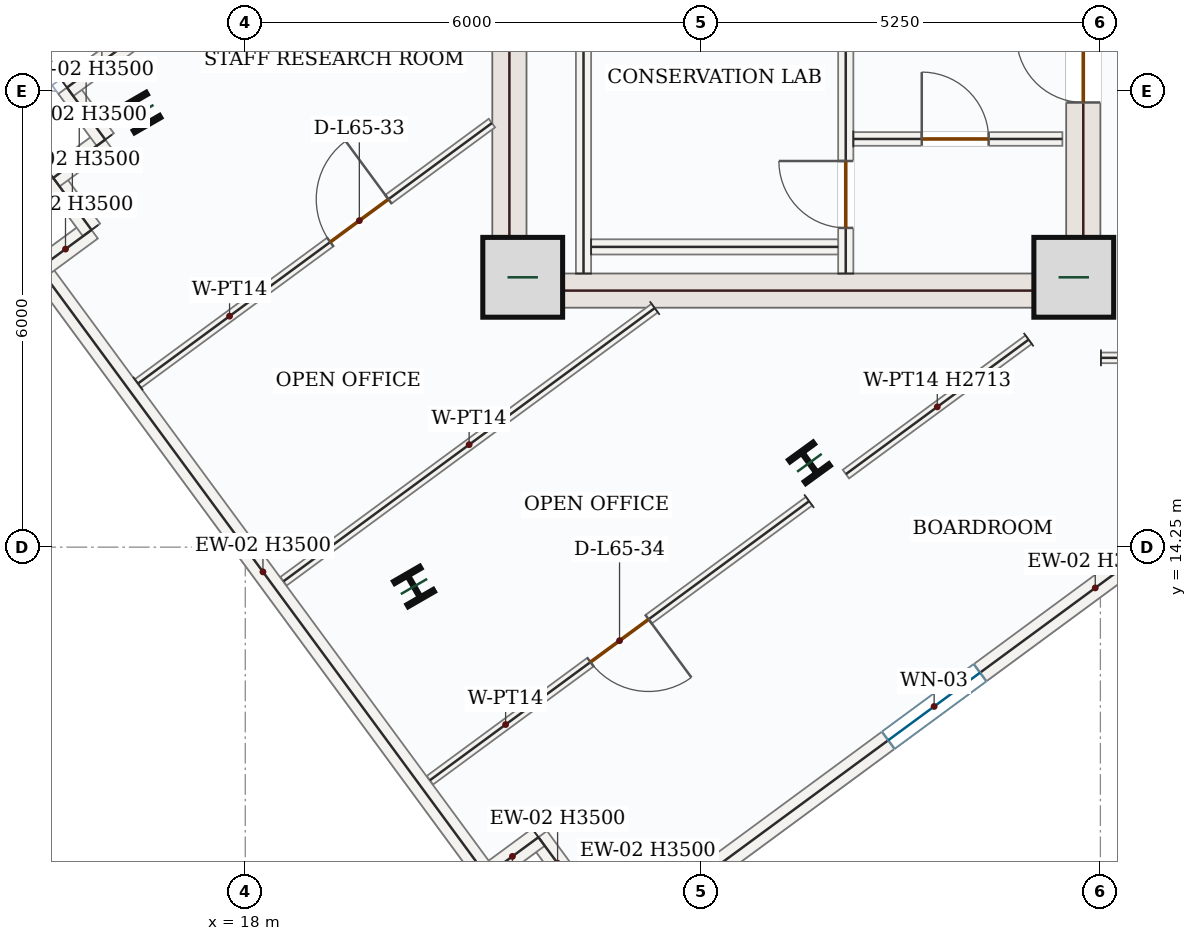
"""IFC4 building model, lengths in metres.
Left out: names, types, materials, properties, quantities, classifications, styles, units other than length and angle.
Written with IfcOpenShell. Run it as: python <this file> out.ifc"""

import sys

from ifc_helpers import new_model, si_unit, direction, frame, frame_2d, origin, origin_2d, place, context, subcontext, project, spatial, rectangle, i_section, extrude, source, transform, mapped, element, fill, save


model = new_model("IFC4")
c1 = context("Model", 3, precision=1e-05, world=origin(), true_north=direction((0.0, 1.0)))
c2 = subcontext(c1, "Body", "Model", "MODEL_VIEW")
j1 = project(units=[si_unit("LENGTHUNIT", "METRE"), si_unit("PLANEANGLEUNIT", "RADIAN")], contexts=[c1])
p1 = place(None, origin())
s1 = spatial("IfcSite", under=j1, at=p1, CompositionType="ELEMENT")
p2 = place(p1, origin())
s2 = spatial("IfcBuilding", under=s1, at=p2, CompositionType="ELEMENT")
p3 = place(p2, frame((0.0, 0.0, 272.85)))
s3 = spatial("IfcBuildingStorey", under=s2, at=p3, CompositionType="ELEMENT", Elevation=272.85)
m1 = source(origin(), c2, "Body", "SweptSolid", [
    extrude(rectangle(XDim=8.55, YDim=0.45, at=frame_2d((4.275, 0.0))), origin(), (0.0, 0.0, 1.0), 3.5),
])
p4 = place(p3, frame((21.475, 17.4, 0.0), z_axis=(0.0, 0.0, 1.0), x_axis=(0.0, 1.0, 0.0)))
e1 = element("IfcWall", 1, at=p4, inside=s3, PredefinedType="SHEAR", context=c2, shape_type="MappedRepresentation", body=[
    mapped(m1, transform((0.0, 0.0, 0.0), x_axis=(1.0, 0.0, 0.0), y_axis=(0.0, 1.0, 0.0), z_axis=(0.0, 0.0, 1.0), scale=1.0)),
])
p5 = place(p3, frame((29.025, 17.4, 0.0), z_axis=(0.0, 0.0, 1.0), x_axis=(0.0, 1.0, 0.0)))
e2 = element("IfcWall", 2, at=p5, inside=s3, PredefinedType="SHEAR", context=c2, shape_type="SweptSolid", body=[
    extrude(rectangle(XDim=8.55, YDim=0.45, at=frame_2d((4.275, 0.0))), origin(), (0.0, 0.0, 1.0), 3.5),
])
p6 = place(p5, frame((6.65, 0.0, 0.0)))
e3 = element("IfcOpeningElement", 3, at=p6, cuts=e2, PredefinedType="OPENING", context=c2, shape_type="SweptSolid", body=[
    extrude(rectangle(XDim=1.1, YDim=2.2, at=frame_2d((0.55, 1.1))), frame((0.0, 0.235, 0.0), z_axis=(0.0, -1.0, 0.0), x_axis=(1.0, 0.0, 0.0)), (0.0, 0.0, 1.0), 0.47),
])
p7 = place(p5, frame((2.7, 0.0, 0.0)))
e4 = element("IfcOpeningElement", 4, at=p7, cuts=e2, PredefinedType="OPENING", context=c2, shape_type="SweptSolid", body=[
    extrude(rectangle(XDim=0.88, YDim=2.1, at=frame_2d((0.44, 1.05))), frame((0.0, 0.235, 0.0), z_axis=(0.0, -1.0, 0.0), x_axis=(1.0, 0.0, 0.0)), (0.0, 0.0, 1.0), 0.47),
])
p8 = place(p5, frame((4.6, 0.0, 0.0)))
e5 = element("IfcOpeningElement", 5, at=p8, cuts=e2, PredefinedType="OPENING", context=c2, shape_type="SweptSolid", body=[
    extrude(rectangle(XDim=0.88, YDim=2.1, at=frame_2d((0.44, 1.05))), frame((0.0, 0.235, 0.0), z_axis=(0.0, -1.0, 0.0), x_axis=(1.0, 0.0, 0.0)), (0.0, 0.0, 1.0), 0.47),
])
m2 = source(origin(), c2, "Body", "SweptSolid", [
    extrude(rectangle(XDim=7.1, YDim=0.45, at=frame_2d((3.55, 0.0))), origin(), (0.0, 0.0, 1.0), 3.5),
])
p9 = place(p3, frame((21.7, 17.625, 0.0), z_axis=(0.0, 0.0, 1.0), x_axis=(1.0, 0.0, 0.0)))
e6 = element("IfcWall", 6, at=p9, inside=s3, PredefinedType="SHEAR", context=c2, shape_type="MappedRepresentation", body=[
    mapped(m2, transform((0.0, 0.0, 0.0), x_axis=(1.0, 0.0, 0.0), y_axis=(0.0, 1.0, 0.0), z_axis=(0.0, 0.0, 1.0), scale=1.0)),
])
m3 = source(origin(), c2, "Body", "SweptSolid", [
    extrude(rectangle(XDim=1.05, YDim=1.05, at=origin_2d()), origin(), (0.0, 0.0, 1.0), 3.75),
])
for number, where, z_axis, x_axis in (
    (7, (21.65, 17.8, 0.0), (0.0, 0.0, 1.0), (1.0, 0.0, 0.0)),
    (8, (28.9, 17.8, 0.0), (0.0, 0.0, 1.0), (1.0, 0.0, 0.0)),
):
    element("IfcColumn", number, at=place(p3, frame(where, z_axis=z_axis, x_axis=x_axis)), inside=s3, PredefinedType="COLUMN", context=c2, shape_type="MappedRepresentation", body=[
        mapped(m3, transform((0.0, 0.0, 0.0), x_axis=(1.0, 0.0, 0.0), y_axis=(0.0, 1.0, 0.0), z_axis=(0.0, 0.0, 1.0), scale=1.0)),
    ])
m4 = source(origin(), c2, "Body", "SweptSolid", [
    extrude(i_section(OverallWidth=0.399, OverallDepth=0.386, WebThickness=0.021, FlangeThickness=0.033, FilletRadius=0.018, at=origin_2d()), origin(), (0.0, 0.0, 1.0), 3.75),
])
for number, where, z_axis, x_axis in (
    (9, (25.422, 15.359, 0.0), (0.0, 0.0, 1.0), (0.809, 0.588, 0.0)),
    (10, (16.62, 19.968, 0.0), (0.0, 0.0, 1.0), (0.866, 0.5, 0.0)),
    (11, (20.22, 13.732, 0.0), (0.0, 0.0, 1.0), (0.866, 0.5, 0.0)),
):
    element("IfcColumn", number, at=place(p3, frame(where, z_axis=z_axis, x_axis=x_axis)), inside=s3, PredefinedType="COLUMN", context=c2, shape_type="MappedRepresentation", body=[
        mapped(m4, transform((0.0, 0.0, 0.0), x_axis=(1.0, 0.0, 0.0), y_axis=(0.0, 1.0, 0.0), z_axis=(0.0, 0.0, 1.0), scale=1.0)),
    ])
p10 = place(p3, frame((30.577, 14.74, 0.0), z_axis=(0.0, 0.0, 1.0), x_axis=(-0.805403112922, -0.592727446383, 0.0)))
e12 = element("IfcWall", 12, at=p10, inside=s3, PredefinedType="SOLIDWALL", context=c2, shape_type="SweptSolid", body=[
    extrude(rectangle(XDim=8.726, YDim=0.28, at=frame_2d((4.363, 0.0))), origin(), (0.0, 0.0, 1.0), 3.5),
])
p11 = place(p10, frame((3.613, 0.0, 0.85)))
e13 = element("IfcOpeningElement", 13, at=p11, cuts=e12, PredefinedType="OPENING", context=c2, shape_type="SweptSolid", body=[
    extrude(rectangle(XDim=1.5, YDim=1.5, at=frame_2d((0.75, 0.75))), frame((0.0, 0.15, 0.0), z_axis=(0.0, -1.0, 0.0), x_axis=(1.0, 0.0, 0.0)), (0.0, 0.0, 1.0), 0.3),
])
m5 = source(origin(), c2, "Body", "SweptSolid", [
    extrude(rectangle(XDim=0.85, YDim=0.28, at=frame_2d((0.425, 0.0))), origin(), (0.0, 0.0, 1.0), 3.5),
])
p12 = place(p3, frame((23.549, 9.568, 0.0), z_axis=(0.0, 0.0, 1.0), x_axis=(-0.592807079659, 0.80534450163, 0.0)))
e14 = element("IfcWall", 14, at=p12, inside=s3, PredefinedType="SOLIDWALL", context=c2, shape_type="MappedRepresentation", body=[
    mapped(m5, transform((0.0, 0.0, 0.0), x_axis=(1.0, 0.0, 0.0), y_axis=(0.0, 1.0, 0.0), z_axis=(0.0, 0.0, 1.0), scale=1.0)),
])
m6 = source(origin(), c2, "Body", "SweptSolid", [
    extrude(rectangle(XDim=0.85, YDim=0.28, at=frame_2d((0.425, 0.0))), origin(), (0.0, 0.0, 1.0), 3.5),
])
for number, where, z_axis, x_axis in (
    (15, (23.045, 10.253, 0.0), (0.0, 0.0, 1.0), (-0.805, -0.593, 0.0)),
    (16, (22.361, 9.749, 0.0), (0.0, 0.0, 1.0), (-0.593, 0.805, 0.0)),
):
    element("IfcWall", number, at=place(p3, frame(where, z_axis=z_axis, x_axis=x_axis)), inside=s3, PredefinedType="SOLIDWALL", context=c2, shape_type="MappedRepresentation", body=[
        mapped(m6, transform((0.0, 0.0, 0.0), x_axis=(1.0, 0.0, 0.0), y_axis=(0.0, 1.0, 0.0), z_axis=(0.0, 0.0, 1.0), scale=1.0)),
    ])
p13 = place(p3, frame((21.857, 10.434, 0.0), z_axis=(0.0, 0.0, 1.0), x_axis=(-0.80534450163, -0.592807079659, 0.0)))
e17 = element("IfcWall", 17, at=p13, inside=s3, PredefinedType="SOLIDWALL", context=c2, shape_type="MappedRepresentation", body=[
    mapped(m5, transform((0.0, 0.0, 0.0), x_axis=(1.0, 0.0, 0.0), y_axis=(0.0, 1.0, 0.0), z_axis=(0.0, 0.0, 1.0), scale=1.0)),
])
m7 = source(origin(), c2, "Body", "SweptSolid", [
    extrude(rectangle(XDim=9.92, YDim=0.28, at=frame_2d((4.96, 0.0))), origin(), (0.0, 0.0, 1.0), 3.5),
])
p14 = place(p3, frame((21.173, 9.93, 0.0), z_axis=(0.0, 0.0, 1.0), x_axis=(-0.592722097771, 0.805407049146, 0.0)))
e18 = element("IfcWall", 18, at=p14, inside=s3, PredefinedType="SOLIDWALL", context=c2, shape_type="MappedRepresentation", body=[
    mapped(m7, transform((0.0, 0.0, 0.0), x_axis=(1.0, 0.0, 0.0), y_axis=(0.0, 1.0, 0.0), z_axis=(0.0, 0.0, 1.0), scale=1.0)),
])
for number, where, z_axis, x_axis in (
    (19, (15.293, 17.919, 0.0), (0.0, 0.0, 1.0), (0.805, 0.593, 0.0)),
    (20, (15.977, 18.423, 0.0), (0.0, 0.0, 1.0), (-0.593, 0.805, 0.0)),
):
    element("IfcWall", number, at=place(p3, frame(where, z_axis=z_axis, x_axis=x_axis)), inside=s3, PredefinedType="SOLIDWALL", context=c2, shape_type="MappedRepresentation", body=[
        mapped(m5, transform((0.0, 0.0, 0.0), x_axis=(1.0, 0.0, 0.0), y_axis=(0.0, 1.0, 0.0), z_axis=(0.0, 0.0, 1.0), scale=1.0)),
    ])
m8 = source(origin(), c2, "Body", "SweptSolid", [
    extrude(rectangle(XDim=0.85, YDim=0.28, at=frame_2d((0.425, 0.0))), origin(), (0.0, 0.0, 1.0), 3.5),
])
p15 = place(p3, frame((15.473, 19.108, 0.0), z_axis=(0.0, 0.0, 1.0), x_axis=(0.805445398986, 0.592669983425, 0.0)))
e21 = element("IfcWall", 21, at=p15, inside=s3, PredefinedType="SOLIDWALL", context=c2, shape_type="MappedRepresentation", body=[
    mapped(m8, transform((0.0, 0.0, 0.0), x_axis=(1.0, 0.0, 0.0), y_axis=(0.0, 1.0, 0.0), z_axis=(0.0, 0.0, 1.0), scale=1.0)),
])
p16 = place(p3, frame((16.158, 19.612, 0.0), z_axis=(0.0, 0.0, 1.0), x_axis=(-0.592807079659, 0.80534450163, 0.0)))
e22 = element("IfcWall", 22, at=p16, inside=s3, PredefinedType="SOLIDWALL", context=c2, shape_type="MappedRepresentation", body=[
    mapped(m5, transform((0.0, 0.0, 0.0), x_axis=(1.0, 0.0, 0.0), y_axis=(0.0, 1.0, 0.0), z_axis=(0.0, 0.0, 1.0), scale=1.0)),
])
p17 = place(p3, frame((15.654, 20.296, 0.0), z_axis=(0.0, 0.0, 1.0), x_axis=(0.805410687764, 0.592717153486, 0.0)))
e23 = element("IfcWall", 23, at=p17, inside=s3, PredefinedType="SOLIDWALL", context=c2, shape_type="SweptSolid", body=[
    extrude(rectangle(XDim=4.079, YDim=0.28, at=frame_2d((2.04, 0.0))), origin(), (0.0, 0.0, 1.0), 3.5),
])
p18 = place(p17, frame((1.29, 0.0, 0.85)))
e24 = element("IfcOpeningElement", 24, at=p18, cuts=e23, PredefinedType="OPENING", context=c2, shape_type="SweptSolid", body=[
    extrude(rectangle(XDim=1.5, YDim=1.5, at=frame_2d((0.75, 0.75))), frame((0.0, 0.15, 0.0), z_axis=(0.0, -1.0, 0.0), x_axis=(1.0, 0.0, 0.0)), (0.0, 0.0, 1.0), 0.3),
])
m9 = source(origin(), c2, "Body", "SweptSolid", [
    extrude(rectangle(XDim=7.87, YDim=0.2, at=frame_2d((3.935, 0.0))), origin(), (0.0, 0.0, 1.0), 3.5),
])
p19 = place(p3, frame((22.45, 17.85, 0.0), z_axis=(0.0, 0.0, 1.0), x_axis=(0.0, 1.0, 0.0)))
e25 = element("IfcWall", 25, at=p19, inside=s3, PredefinedType="SOLIDWALL", context=c2, shape_type="MappedRepresentation", body=[
    mapped(m9, transform((0.0, 0.0, 0.0), x_axis=(1.0, 0.0, 0.0), y_axis=(0.0, 1.0, 0.0), z_axis=(0.0, 0.0, 1.0), scale=1.0)),
])
p20 = place(p3, frame((25.9, 17.85, 0.0), z_axis=(0.0, 0.0, 1.0), x_axis=(0.0, 1.0, 0.0)))
e26 = element("IfcWall", 26, at=p20, inside=s3, PredefinedType="SOLIDWALL", context=c2, shape_type="SweptSolid", body=[
    extrude(rectangle(XDim=8.0, YDim=0.2, at=frame_2d((4.0, 0.0))), origin(), (0.0, 0.0, 1.0), 3.5),
])
p21 = place(p20, frame((6.2, 0.0, 0.0)))
e27 = element("IfcOpeningElement", 27, at=p21, cuts=e26, PredefinedType="OPENING", context=c2, shape_type="SweptSolid", body=[
    extrude(rectangle(XDim=1.0, YDim=2.15, at=frame_2d((0.5, 1.075))), frame((0.0, 0.11, 0.0), z_axis=(0.0, -1.0, 0.0), x_axis=(1.0, 0.0, 0.0)), (0.0, 0.0, 1.0), 0.22),
])
p22 = place(p20, frame((0.6, 0.0, 0.0)))
e28 = element("IfcOpeningElement", 28, at=p22, cuts=e26, PredefinedType="OPENING", context=c2, shape_type="SweptSolid", body=[
    extrude(rectangle(XDim=0.88, YDim=2.1, at=frame_2d((0.44, 1.05))), frame((0.0, 0.11, 0.0), z_axis=(0.0, -1.0, 0.0), x_axis=(1.0, 0.0, 0.0)), (0.0, 0.0, 1.0), 0.22),
])
m10 = source(origin(), c2, "Body", "SweptSolid", [
    extrude(rectangle(XDim=3.25, YDim=0.2, at=frame_2d((1.625, 0.0))), origin(), (0.0, 0.0, 1.0), 3.5),
])
p23 = place(p3, frame((22.55, 18.2, 0.0), z_axis=(0.0, 0.0, 1.0), x_axis=(1.0, 0.0, 0.0)))
e29 = element("IfcWall", 29, at=p23, inside=s3, PredefinedType="SOLIDWALL", context=c2, shape_type="MappedRepresentation", body=[
    mapped(m10, transform((0.0, 0.0, 0.0), x_axis=(1.0, 0.0, 0.0), y_axis=(0.0, 1.0, 0.0), z_axis=(0.0, 0.0, 1.0), scale=1.0)),
])
p24 = place(p3, frame((26.0, 19.62, 0.0), z_axis=(0.0, 0.0, 1.0), x_axis=(1.0, 0.0, 0.0)))
e30 = element("IfcWall", 30, at=p24, inside=s3, PredefinedType="PARTITIONING", context=c2, shape_type="SweptSolid", body=[
    extrude(rectangle(XDim=2.75, YDim=0.18, at=frame_2d((1.375, 0.0))), origin(), (0.0, 0.0, 1.0), 3.5),
])
p25 = place(p24, frame((0.9, 0.0, 0.0)))
e31 = element("IfcOpeningElement", 31, at=p25, cuts=e30, PredefinedType="OPENING", context=c2, shape_type="SweptSolid", body=[
    extrude(rectangle(XDim=0.88, YDim=2.1, at=frame_2d((0.44, 1.05))), frame((0.0, 0.1, 0.0), z_axis=(0.0, -1.0, 0.0), x_axis=(1.0, 0.0, 0.0)), (0.0, 0.0, 1.0), 0.2),
])
m11 = source(origin(), c2, "Body", "SweptSolid", [
    extrude(rectangle(XDim=6.063, YDim=0.14, at=frame_2d((3.032, 0.0))), origin(), (0.0, 0.0, 1.0), 3.5),
])
p26 = place(p3, frame((23.387, 17.395, 0.0), z_axis=(0.0, 0.0, 1.0), x_axis=(-0.805422045282, -0.59270172007, 0.0)))
e32 = element("IfcWall", 32, at=p26, inside=s3, PredefinedType="PARTITIONING", context=c2, shape_type="MappedRepresentation", body=[
    mapped(m11, transform((0.0, 0.0, 0.0), x_axis=(1.0, 0.0, 0.0), y_axis=(0.0, 1.0, 0.0), z_axis=(0.0, 0.0, 1.0), scale=1.0)),
])
p27 = place(p3, frame((16.589, 16.403, 0.0), z_axis=(0.0, 0.0, 1.0), x_axis=(0.80540492624, 0.592724982423, 0.0)))
e33 = element("IfcWall", 33, at=p27, inside=s3, PredefinedType="PARTITIONING", context=c2, shape_type="SweptSolid", body=[
    extrude(rectangle(XDim=5.781, YDim=0.14, at=frame_2d((2.891, 0.0))), origin(), (0.0, 0.0, 1.0), 3.5),
])
p28 = place(p27, frame((3.14, 0.0, 0.0)))
e34 = element("IfcOpeningElement", 34, at=p28, cuts=e33, PredefinedType="OPENING", context=c2, shape_type="SweptSolid", body=[
    extrude(rectangle(XDim=0.95, YDim=2.15, at=frame_2d((0.475, 1.075))), frame((0.0, 0.08, 0.0), z_axis=(0.0, -1.0, 0.0), x_axis=(1.0, 0.0, 0.0)), (0.0, 0.0, 1.0), 0.16),
])
m12 = source(origin(), c2, "Body", "SweptSolid", [
    extrude(rectangle(XDim=2.985, YDim=0.14, at=frame_2d((1.492, 0.0))), origin(), (0.0, 0.0, 1.0), 2.713),
])
p29 = place(p3, frame((28.306, 16.98, 0.0), z_axis=(0.0, 0.0, 1.0), x_axis=(-0.80539491033, -0.592738591973, 0.0)))
e35 = element("IfcWall", 35, at=p29, inside=s3, PredefinedType="PARTITIONING", context=c2, shape_type="MappedRepresentation", body=[
    mapped(m12, transform((0.0, 0.0, 0.0), x_axis=(1.0, 0.0, 0.0), y_axis=(0.0, 1.0, 0.0), z_axis=(0.0, 0.0, 1.0), scale=1.0)),
])
p30 = place(p3, frame((25.418, 14.854, 0.0), z_axis=(0.0, 0.0, 1.0), x_axis=(-0.805402487917, -0.592728295645, 0.0)))
e36 = element("IfcWall", 36, at=p30, inside=s3, PredefinedType="PARTITIONING", context=c2, shape_type="SweptSolid", body=[
    extrude(rectangle(XDim=6.193, YDim=0.14, at=frame_2d((3.097, 0.0))), origin(), (0.0, 0.0, 1.0), 3.5),
])
p31 = place(p30, frame((2.622, 0.0, 0.0)))
e37 = element("IfcOpeningElement", 37, at=p31, cuts=e36, PredefinedType="OPENING", context=c2, shape_type="SweptSolid", body=[
    extrude(rectangle(XDim=0.95, YDim=2.15, at=frame_2d((0.475, 1.075))), frame((0.0, 0.08, 0.0), z_axis=(0.0, -1.0, 0.0), x_axis=(1.0, 0.0, 0.0)), (0.0, 0.0, 1.0), 0.16),
])
p32 = place(p3, frame((29.258, 16.74, 0.0), z_axis=(0.0, 0.0, 1.0), x_axis=(0.999999998895, -4.7021207e-05, 0.0)))
e38 = element("IfcWall", 38, at=p32, inside=s3, PredefinedType="PARTITIONING", context=c2, shape_type="SweptSolid", body=[
    extrude(rectangle(XDim=5.192, YDim=0.14, at=frame_2d((2.596, 0.0))), origin(), (0.0, 0.0, 1.0), 3.5),
])
p33 = place(p32, frame((3.309, 0.0, 0.0)))
e39 = element("IfcOpeningElement", 39, at=p33, cuts=e38, PredefinedType="OPENING", context=c2, shape_type="SweptSolid", body=[
    extrude(rectangle(XDim=0.95, YDim=2.15, at=frame_2d((0.475, 1.075))), frame((0.0, 0.08, 0.0), z_axis=(0.0, -1.0, 0.0), x_axis=(1.0, 0.0, 0.0)), (0.0, 0.0, 1.0), 0.16),
])
m13 = source(origin(), c2, "Body", "SweptSolid", [
    extrude(rectangle(XDim=1.5, YDim=1.5, at=frame_2d((0.75, 0.75))), frame((0.0, 0.03, 0.0), z_axis=(0.0, -1.0, 0.0), x_axis=(1.0, 0.0, 0.0)), (0.0, 0.0, 1.0), 0.06),
])
p34 = place(p11, origin())
e40 = element("IfcWindow", 40, at=p34, inside=s3, PartitioningType="SINGLE_PANEL", PredefinedType="WINDOW", context=c2, shape_type="MappedRepresentation", body=[
    mapped(m13, transform((0.0, 0.0, 0.0), x_axis=(1.0, 0.0, 0.0), y_axis=(0.0, 1.0, 0.0), z_axis=(0.0, 0.0, 1.0), scale=1.0)),
])
fill(e13, e40)
m14 = source(origin(), c2, "Body", "SweptSolid", [
    extrude(rectangle(XDim=0.88, YDim=2.1, at=frame_2d((0.44, 1.05))), frame((0.0, 0.025, 0.0), z_axis=(0.0, -1.0, 0.0), x_axis=(1.0, 0.0, 0.0)), (0.0, 0.0, 1.0), 0.05),
])
p35 = place(p22, origin())
e41 = element("IfcDoor", 41, at=p35, inside=s3, OperationType="SINGLE_SWING_RIGHT", PredefinedType="DOOR", context=c2, shape_type="MappedRepresentation", body=[
    mapped(m14, transform((0.0, 0.0, 0.0), x_axis=(1.0, 0.0, 0.0), y_axis=(0.0, 1.0, 0.0), z_axis=(0.0, 0.0, 1.0), scale=1.0)),
])
fill(e28, e41)
p36 = place(p25, origin())
e42 = element("IfcDoor", 42, at=p36, inside=s3, OperationType="SINGLE_SWING_LEFT", PredefinedType="DOOR", context=c2, shape_type="MappedRepresentation", body=[
    mapped(m14, transform((0.0, 0.0, 0.0), x_axis=(1.0, 0.0, 0.0), y_axis=(0.0, 1.0, 0.0), z_axis=(0.0, 0.0, 1.0), scale=1.0)),
])
fill(e31, e42)
p37 = place(p7, origin())
e43 = element("IfcDoor", 43, at=p37, inside=s3, OperationType="SINGLE_SWING_RIGHT", PredefinedType="DOOR", context=c2, shape_type="MappedRepresentation", body=[
    mapped(m14, transform((0.0, 0.0, 0.0), x_axis=(1.0, 0.0, 0.0), y_axis=(0.0, 1.0, 0.0), z_axis=(0.0, 0.0, 1.0), scale=1.0)),
])
fill(e4, e43)
m15 = source(origin(), c2, "Body", "SweptSolid", [
    extrude(rectangle(XDim=0.95, YDim=2.15, at=frame_2d((0.475, 1.075))), frame((0.0, 0.025, 0.0), z_axis=(0.0, -1.0, 0.0), x_axis=(1.0, 0.0, 0.0)), (0.0, 0.0, 1.0), 0.05),
])
p38 = place(p28, origin())
e44 = element("IfcDoor", 44, at=p38, inside=s3, OperationType="SINGLE_SWING_RIGHT", PredefinedType="DOOR", context=c2, shape_type="MappedRepresentation", body=[
    mapped(m15, transform((0.0, 0.0, 0.0), x_axis=(1.0, 0.0, 0.0), y_axis=(0.0, 1.0, 0.0), z_axis=(0.0, 0.0, 1.0), scale=1.0)),
])
fill(e34, e44)
p39 = place(p31, origin())
e45 = element("IfcDoor", 45, at=p39, inside=s3, OperationType="SINGLE_SWING_LEFT", PredefinedType="DOOR", context=c2, shape_type="MappedRepresentation", body=[
    mapped(m15, transform((0.0, 0.0, 0.0), x_axis=(1.0, 0.0, 0.0), y_axis=(0.0, 1.0, 0.0), z_axis=(0.0, 0.0, 1.0), scale=1.0)),
])
fill(e37, e45)
save(model, sys.argv[1])
